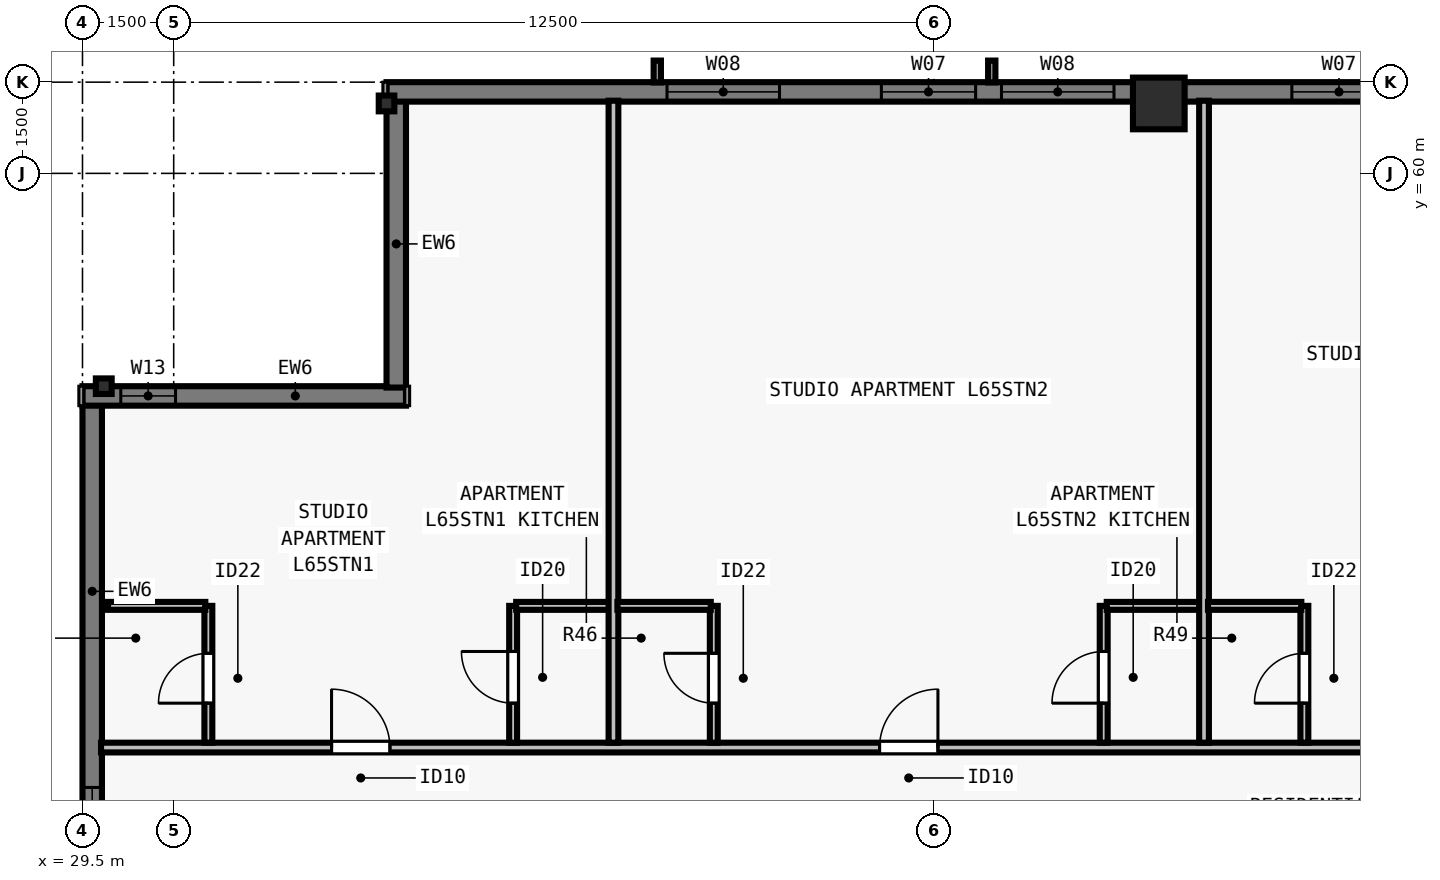
"""IFC4 building model, lengths in metres.
Left out: names, types, materials, properties, quantities, classifications, styles, units other than length and angle.
Written with IfcOpenShell. Run it as: python <this file> out.ifc"""

import sys

from ifc_helpers import new_model, si_unit, direction, frame, frame_2d, origin, origin_2d, place, context, subcontext, project, spatial, rectangle, i_section, extrude, element, fill, save


model = new_model("IFC4")
c1 = context("Model", 3, precision=1e-05, world=origin(), true_north=direction((0.0, 1.0)))
c2 = subcontext(c1, "Body", "Model", "MODEL_VIEW")
j1 = project(units=[si_unit("LENGTHUNIT", "METRE"), si_unit("PLANEANGLEUNIT", "RADIAN")], contexts=[c1])
p1 = place(None, origin())
s1 = spatial("IfcSite", under=j1, at=p1, CompositionType="ELEMENT")
p2 = place(p1, origin())
s2 = spatial("IfcBuilding", under=s1, at=p2, CompositionType="ELEMENT")
p3 = place(p2, frame((0.0, 0.0, 237.5)))
s3 = spatial("IfcBuildingStorey", under=s2, at=p3, CompositionType="ELEMENT", Elevation=237.5)
p4 = place(p3, frame((47.2, 61.15, 0.0), z_axis=(0.0, 0.0, 1.0), x_axis=(1.0, 0.0, 0.0)))
e1 = element("IfcColumn", 1, at=p4, inside=s3, PredefinedType="COLUMN", context=c2, shape_type="SweptSolid", body=[
    extrude(rectangle(XDim=0.85, YDim=0.85, at=origin_2d()), origin(), (0.0, 0.0, 1.0), 3.5),
])
for number, where, z_axis, x_axis in (
    (2, (34.5, 61.15, 0.0), (0.0, 0.0, 1.0), (1.0, 0.0, 0.0)),
    (3, (29.85, 56.5, 0.0), (0.0, 0.0, 1.0), (0.0, 1.0, 0.0)),
):
    element("IfcColumn", number, at=place(p3, frame(where, z_axis=z_axis, x_axis=x_axis)), inside=s3, PredefinedType="COLUMN", context=c2, shape_type="SweptSolid", body=[
        extrude(i_section(OverallWidth=0.256, OverallDepth=0.26, WebThickness=0.01, FlangeThickness=0.017, FilletRadius=0.013, at=origin_2d()), origin(), (0.0, 0.0, 1.0), 3.5),
    ])
p5 = place(p3, frame((29.66, 41.6, 0.0), z_axis=(0.0, 0.0, 1.0), x_axis=(0.0, 1.0, 0.0)))
e4 = element("IfcWall", 4, at=p5, inside=s3, PredefinedType="SOLIDWALL", context=c2, shape_type="SweptSolid", body=[
    extrude(rectangle(XDim=14.602, YDim=0.32, at=frame_2d((7.301, 0.0))), origin(), (0.0, 0.0, 1.0), 3.29),
])
p6 = place(p5, frame((3.15, 0.0, 0.8)))
e5 = element("IfcOpeningElement", 5, at=p6, cuts=e4, PredefinedType="OPENING", context=c2, shape_type="SweptSolid", body=[
    extrude(rectangle(XDim=1.85, YDim=1.678, at=frame_2d((0.925, 0.839))), frame((0.0, 0.17, 0.0), z_axis=(0.0, -1.0, 0.0), x_axis=(1.0, 0.0, 0.0)), (0.0, 0.0, 1.0), 0.34),
])
p7 = place(p5, frame((6.751, 0.0, 0.8)))
e6 = element("IfcOpeningElement", 6, at=p7, cuts=e4, PredefinedType="OPENING", context=c2, shape_type="SweptSolid", body=[
    extrude(rectangle(XDim=1.55, YDim=1.678, at=frame_2d((0.775, 0.839))), frame((0.0, 0.17, 0.0), z_axis=(0.0, -1.0, 0.0), x_axis=(1.0, 0.0, 0.0)), (0.0, 0.0, 1.0), 0.34),
])
p8 = place(p3, frame((29.5, 56.34, 0.0), z_axis=(0.0, 0.0, 1.0), x_axis=(1.0, 0.0, 0.0)))
e7 = element("IfcWall", 7, at=p8, inside=s3, PredefinedType="SOLIDWALL", context=c2, shape_type="SweptSolid", body=[
    extrude(rectangle(XDim=5.32, YDim=0.32, at=frame_2d((2.66, 0.0))), origin(), (0.0, 0.0, 1.0), 3.29),
])
p9 = place(p8, frame((0.63, 0.0, 0.8)))
e8 = element("IfcOpeningElement", 8, at=p9, cuts=e7, PredefinedType="OPENING", context=c2, shape_type="SweptSolid", body=[
    extrude(rectangle(XDim=0.9, YDim=1.678, at=frame_2d((0.45, 0.839))), frame((0.0, 0.17, 0.0), z_axis=(0.0, -1.0, 0.0), x_axis=(1.0, 0.0, 0.0)), (0.0, 0.0, 1.0), 0.34),
])
p10 = place(p3, frame((34.66, 56.478, 0.0), z_axis=(0.0, 0.0, 1.0), x_axis=(0.0, 1.0, 0.0)))
e9 = element("IfcWall", 9, at=p10, inside=s3, PredefinedType="SOLIDWALL", context=c2, shape_type="SweptSolid", body=[
    extrude(rectangle(XDim=4.724, YDim=0.32, at=frame_2d((2.362, 0.0))), origin(), (0.0, 0.0, 1.0), 3.29),
])
p11 = place(p3, frame((34.5, 61.34, 0.0), z_axis=(0.0, 0.0, 1.0), x_axis=(1.0, 0.0, 0.0)))
e10 = element("IfcWall", 10, at=p11, inside=s3, PredefinedType="SOLIDWALL", context=c2, shape_type="SweptSolid", body=[
    extrude(rectangle(XDim=34.702, YDim=0.32, at=frame_2d((17.351, 0.0))), origin(), (0.0, 0.0, 1.0), 3.29),
])
p12 = place(p11, frame((4.613, 0.0, 0.8)))
e11 = element("IfcOpeningElement", 11, at=p12, cuts=e10, PredefinedType="OPENING", context=c2, shape_type="SweptSolid", body=[
    extrude(rectangle(XDim=1.85, YDim=1.678, at=frame_2d((0.925, 0.839))), frame((0.0, 0.17, 0.0), z_axis=(0.0, -1.0, 0.0), x_axis=(1.0, 0.0, 0.0)), (0.0, 0.0, 1.0), 0.34),
])
p13 = place(p11, frame((8.138, 0.0, 0.8)))
e12 = element("IfcOpeningElement", 12, at=p13, cuts=e10, PredefinedType="OPENING", context=c2, shape_type="SweptSolid", body=[
    extrude(rectangle(XDim=1.55, YDim=1.678, at=frame_2d((0.775, 0.839))), frame((0.0, 0.17, 0.0), z_axis=(0.0, -1.0, 0.0), x_axis=(1.0, 0.0, 0.0)), (0.0, 0.0, 1.0), 0.34),
])
p14 = place(p11, frame((10.113, 0.0, 0.8)))
e13 = element("IfcOpeningElement", 13, at=p14, cuts=e10, PredefinedType="OPENING", context=c2, shape_type="SweptSolid", body=[
    extrude(rectangle(XDim=1.85, YDim=1.678, at=frame_2d((0.925, 0.839))), frame((0.0, 0.17, 0.0), z_axis=(0.0, -1.0, 0.0), x_axis=(1.0, 0.0, 0.0)), (0.0, 0.0, 1.0), 0.34),
])
p15 = place(p11, frame((14.888, 0.0, 0.8)))
e14 = element("IfcOpeningElement", 14, at=p15, cuts=e10, PredefinedType="OPENING", context=c2, shape_type="SweptSolid", body=[
    extrude(rectangle(XDim=1.55, YDim=1.678, at=frame_2d((0.775, 0.839))), frame((0.0, 0.17, 0.0), z_axis=(0.0, -1.0, 0.0), x_axis=(1.0, 0.0, 0.0)), (0.0, 0.0, 1.0), 0.34),
])
p16 = place(p11, frame((18.114, 0.0, 0.8)))
e15 = element("IfcOpeningElement", 15, at=p16, cuts=e10, PredefinedType="OPENING", context=c2, shape_type="SweptSolid", body=[
    extrude(rectangle(XDim=1.85, YDim=1.678, at=frame_2d((0.925, 0.839))), frame((0.0, 0.17, 0.0), z_axis=(0.0, -1.0, 0.0), x_axis=(1.0, 0.0, 0.0)), (0.0, 0.0, 1.0), 0.34),
])
p17 = place(p11, frame((24.864, 0.0, 0.8)))
e16 = element("IfcOpeningElement", 16, at=p17, cuts=e10, PredefinedType="OPENING", context=c2, shape_type="SweptSolid", body=[
    extrude(rectangle(XDim=1.85, YDim=1.678, at=frame_2d((0.925, 0.839))), frame((0.0, 0.17, 0.0), z_axis=(0.0, -1.0, 0.0), x_axis=(1.0, 0.0, 0.0)), (0.0, 0.0, 1.0), 0.34),
])
p18 = place(p11, frame((28.389, 0.0, 0.8)))
e17 = element("IfcOpeningElement", 17, at=p18, cuts=e10, PredefinedType="OPENING", context=c2, shape_type="SweptSolid", body=[
    extrude(rectangle(XDim=1.55, YDim=1.678, at=frame_2d((0.775, 0.839))), frame((0.0, 0.17, 0.0), z_axis=(0.0, -1.0, 0.0), x_axis=(1.0, 0.0, 0.0)), (0.0, 0.0, 1.0), 0.34),
])
p19 = place(p3, frame((29.805, 50.558, 0.0), z_axis=(0.0, 0.0, 1.0), x_axis=(1.0, 0.0, 0.0)))
e18 = element("IfcWall", 18, at=p19, inside=s3, PredefinedType="PARTITIONING", context=c2, shape_type="SweptSolid", body=[
    extrude(rectangle(XDim=44.39, YDim=0.16, at=frame_2d((22.195, 0.0))), origin(), (0.0, 0.0, 1.0), 2.958),
])
p20 = place(p19, frame((3.791, 0.0, 0.0)))
e19 = element("IfcOpeningElement", 19, at=p20, cuts=e18, PredefinedType="OPENING", context=c2, shape_type="SweptSolid", body=[
    extrude(rectangle(XDim=0.96, YDim=2.18, at=frame_2d((0.48, 1.09))), frame((0.0, 0.09, 0.0), z_axis=(0.0, -1.0, 0.0), x_axis=(1.0, 0.0, 0.0)), (0.0, 0.0, 1.0), 0.18),
])
p21 = place(p19, frame((12.803, 0.0, 0.0)))
e20 = element("IfcOpeningElement", 20, at=p21, cuts=e18, PredefinedType="OPENING", context=c2, shape_type="SweptSolid", body=[
    extrude(rectangle(XDim=0.96, YDim=2.18, at=frame_2d((0.48, 1.09))), frame((0.0, 0.09, 0.0), z_axis=(0.0, -1.0, 0.0), x_axis=(1.0, 0.0, 0.0)), (0.0, 0.0, 1.0), 0.18),
])
p22 = place(p19, frame((21.635, 0.0, 0.0)))
e21 = element("IfcOpeningElement", 21, at=p22, cuts=e18, PredefinedType="OPENING", context=c2, shape_type="SweptSolid", body=[
    extrude(rectangle(XDim=0.96, YDim=2.18, at=frame_2d((0.48, 1.09))), frame((0.0, 0.09, 0.0), z_axis=(0.0, -1.0, 0.0), x_axis=(1.0, 0.0, 0.0)), (0.0, 0.0, 1.0), 0.18),
])
p23 = place(p19, frame((30.467, 0.0, 0.0)))
e22 = element("IfcOpeningElement", 22, at=p23, cuts=e18, PredefinedType="OPENING", context=c2, shape_type="SweptSolid", body=[
    extrude(rectangle(XDim=0.96, YDim=2.18, at=frame_2d((0.48, 1.09))), frame((0.0, 0.09, 0.0), z_axis=(0.0, -1.0, 0.0), x_axis=(1.0, 0.0, 0.0)), (0.0, 0.0, 1.0), 0.18),
])
p24 = place(p19, frame((39.559, 0.0, 0.0)))
e23 = element("IfcOpeningElement", 23, at=p24, cuts=e18, PredefinedType="OPENING", context=c2, shape_type="SweptSolid", body=[
    extrude(rectangle(XDim=0.96, YDim=2.18, at=frame_2d((0.48, 1.09))), frame((0.0, 0.09, 0.0), z_axis=(0.0, -1.0, 0.0), x_axis=(1.0, 0.0, 0.0)), (0.0, 0.0, 1.0), 0.18),
])
p25 = place(p3, frame((31.57, 50.637, 0.0), z_axis=(0.0, 0.0, 1.0), x_axis=(0.0, 1.0, 0.0)))
e24 = element("IfcWall", 24, at=p25, inside=s3, PredefinedType="PLUMBINGWALL", context=c2, shape_type="SweptSolid", body=[
    extrude(rectangle(XDim=2.25, YDim=0.13, at=frame_2d((1.125, 0.0))), origin(), (0.0, 0.0, 1.0), 3.29),
])
p26 = place(p25, frame((0.65, 0.0, 0.0)))
e25 = element("IfcOpeningElement", 25, at=p26, cuts=e24, PredefinedType="OPENING", context=c2, shape_type="SweptSolid", body=[
    extrude(rectangle(XDim=0.82, YDim=2.1, at=frame_2d((0.41, 1.05))), frame((0.0, 0.075, 0.0), z_axis=(0.0, -1.0, 0.0), x_axis=(1.0, 0.0, 0.0)), (0.0, 0.0, 1.0), 0.15),
])
p27 = place(p3, frame((29.92, 52.887, 0.0), z_axis=(0.0, 0.0, 1.0), x_axis=(1.0, 0.0, 0.0)))
e26 = element("IfcWall", 26, at=p27, inside=s3, PredefinedType="PLUMBINGWALL", context=c2, shape_type="SweptSolid", body=[
    extrude(rectangle(XDim=1.6, YDim=0.13, at=frame_2d((0.8, 0.0))), origin(), (0.0, 0.0, 1.0), 3.29),
])
p28 = place(p3, frame((36.582, 50.637, 0.0), z_axis=(0.0, 0.0, 1.0), x_axis=(0.0, 1.0, 0.0)))
e27 = element("IfcWall", 27, at=p28, inside=s3, PredefinedType="PLUMBINGWALL", context=c2, shape_type="SweptSolid", body=[
    extrude(rectangle(XDim=2.25, YDim=0.13, at=frame_2d((1.125, 0.0))), origin(), (0.0, 0.0, 1.0), 3.29),
])
p29 = place(p28, frame((0.65, 0.0, 0.0)))
e28 = element("IfcOpeningElement", 28, at=p29, cuts=e27, PredefinedType="OPENING", context=c2, shape_type="SweptSolid", body=[
    extrude(rectangle(XDim=0.85, YDim=2.1, at=frame_2d((0.425, 1.05))), frame((0.0, 0.075, 0.0), z_axis=(0.0, -1.0, 0.0), x_axis=(1.0, 0.0, 0.0)), (0.0, 0.0, 1.0), 0.15),
])
p30 = place(p3, frame((36.632, 52.887, 0.0), z_axis=(0.0, 0.0, 1.0), x_axis=(1.0, 0.0, 0.0)))
e29 = element("IfcWall", 29, at=p30, inside=s3, PredefinedType="PLUMBINGWALL", context=c2, shape_type="SweptSolid", body=[
    extrude(rectangle(XDim=1.6, YDim=0.13, at=frame_2d((0.8, 0.0))), origin(), (0.0, 0.0, 1.0), 3.29),
])
p31 = place(p3, frame((38.232, 50.637, 0.0), z_axis=(0.0, 0.0, 1.0), x_axis=(0.0, 1.0, 0.0)))
e30 = element("IfcWall", 30, at=p31, inside=s3, PredefinedType="PARTITIONING", context=c2, shape_type="SweptSolid", body=[
    extrude(rectangle(XDim=10.558, YDim=0.16, at=frame_2d((5.279, 0.0))), origin(), (0.0, 0.0, 1.0), 2.573),
])
p32 = place(p3, frame((39.882, 50.637, 0.0), z_axis=(0.0, 0.0, 1.0), x_axis=(0.0, 1.0, 0.0)))
e31 = element("IfcWall", 31, at=p32, inside=s3, PredefinedType="PLUMBINGWALL", context=c2, shape_type="SweptSolid", body=[
    extrude(rectangle(XDim=2.25, YDim=0.13, at=frame_2d((1.125, 0.0))), origin(), (0.0, 0.0, 1.0), 3.29),
])
p33 = place(p32, frame((0.65, 0.0, 0.0)))
e32 = element("IfcOpeningElement", 32, at=p33, cuts=e31, PredefinedType="OPENING", context=c2, shape_type="SweptSolid", body=[
    extrude(rectangle(XDim=0.82, YDim=2.1, at=frame_2d((0.41, 1.05))), frame((0.0, 0.075, 0.0), z_axis=(0.0, -1.0, 0.0), x_axis=(1.0, 0.0, 0.0)), (0.0, 0.0, 1.0), 0.15),
])
p34 = place(p3, frame((38.297, 52.887, 0.0), z_axis=(0.0, 0.0, 1.0), x_axis=(1.0, 0.0, 0.0)))
e33 = element("IfcWall", 33, at=p34, inside=s3, PredefinedType="PLUMBINGWALL", context=c2, shape_type="SweptSolid", body=[
    extrude(rectangle(XDim=1.535, YDim=0.13, at=frame_2d((0.768, 0.0))), origin(), (0.0, 0.0, 1.0), 3.29),
])
p35 = place(p3, frame((46.294, 50.637, 0.0), z_axis=(0.0, 0.0, 1.0), x_axis=(0.0, 1.0, 0.0)))
e34 = element("IfcWall", 34, at=p35, inside=s3, PredefinedType="PLUMBINGWALL", context=c2, shape_type="SweptSolid", body=[
    extrude(rectangle(XDim=2.25, YDim=0.13, at=frame_2d((1.125, 0.0))), origin(), (0.0, 0.0, 1.0), 3.29),
])
p36 = place(p35, frame((0.65, 0.0, 0.0)))
e35 = element("IfcOpeningElement", 35, at=p36, cuts=e34, PredefinedType="OPENING", context=c2, shape_type="SweptSolid", body=[
    extrude(rectangle(XDim=0.85, YDim=2.1, at=frame_2d((0.425, 1.05))), frame((0.0, 0.075, 0.0), z_axis=(0.0, -1.0, 0.0), x_axis=(1.0, 0.0, 0.0)), (0.0, 0.0, 1.0), 0.15),
])
p37 = place(p3, frame((46.344, 52.887, 0.0), z_axis=(0.0, 0.0, 1.0), x_axis=(1.0, 0.0, 0.0)))
e36 = element("IfcWall", 36, at=p37, inside=s3, PredefinedType="PLUMBINGWALL", context=c2, shape_type="SweptSolid", body=[
    extrude(rectangle(XDim=1.6, YDim=0.13, at=frame_2d((0.8, 0.0))), origin(), (0.0, 0.0, 1.0), 3.29),
])
p38 = place(p3, frame((47.944, 50.637, 0.0), z_axis=(0.0, 0.0, 1.0), x_axis=(0.0, 1.0, 0.0)))
e37 = element("IfcWall", 37, at=p38, inside=s3, PredefinedType="PARTITIONING", context=c2, shape_type="SweptSolid", body=[
    extrude(rectangle(XDim=10.558, YDim=0.16, at=frame_2d((5.279, 0.0))), origin(), (0.0, 0.0, 1.0), 3.29),
])
p39 = place(p3, frame((49.594, 50.637, 0.0), z_axis=(0.0, 0.0, 1.0), x_axis=(0.0, 1.0, 0.0)))
e38 = element("IfcWall", 38, at=p39, inside=s3, PredefinedType="PLUMBINGWALL", context=c2, shape_type="SweptSolid", body=[
    extrude(rectangle(XDim=2.25, YDim=0.13, at=frame_2d((1.125, 0.0))), origin(), (0.0, 0.0, 1.0), 2.958),
])
p40 = place(p39, frame((0.65, 0.0, 0.0)))
e39 = element("IfcOpeningElement", 39, at=p40, cuts=e38, PredefinedType="OPENING", context=c2, shape_type="SweptSolid", body=[
    extrude(rectangle(XDim=0.82, YDim=2.1, at=frame_2d((0.41, 1.05))), frame((0.0, 0.075, 0.0), z_axis=(0.0, -1.0, 0.0), x_axis=(1.0, 0.0, 0.0)), (0.0, 0.0, 1.0), 0.15),
])
p41 = place(p3, frame((48.009, 52.887, 0.0), z_axis=(0.0, 0.0, 1.0), x_axis=(1.0, 0.0, 0.0)))
e40 = element("IfcWall", 40, at=p41, inside=s3, PredefinedType="PLUMBINGWALL", context=c2, shape_type="SweptSolid", body=[
    extrude(rectangle(XDim=1.535, YDim=0.13, at=frame_2d((0.768, 0.0))), origin(), (0.0, 0.0, 1.0), 3.29),
])
p42 = place(p7, origin())
e41 = element("IfcWindow", 41, at=p42, inside=s3, PartitioningType="SINGLE_PANEL", PredefinedType="WINDOW", context=c2, shape_type="SweptSolid", body=[
    extrude(rectangle(XDim=1.55, YDim=1.678, at=frame_2d((0.775, 0.839))), frame((0.0, -0.05, 0.0), z_axis=(0.0, -1.0, 0.0), x_axis=(1.0, 0.0, 0.0)), (0.0, 0.0, 1.0), 0.06),
])
fill(e6, e41)
p43 = place(p12, origin())
e42 = element("IfcWindow", 42, at=p43, inside=s3, PartitioningType="SINGLE_PANEL", PredefinedType="WINDOW", context=c2, shape_type="SweptSolid", body=[
    extrude(rectangle(XDim=1.85, YDim=1.678, at=frame_2d((0.925, 0.839))), frame((0.0, -0.05, 0.0), z_axis=(0.0, -1.0, 0.0), x_axis=(1.0, 0.0, 0.0)), (0.0, 0.0, 1.0), 0.06),
])
fill(e11, e42)
p44 = place(p13, origin())
e43 = element("IfcWindow", 43, at=p44, inside=s3, PartitioningType="SINGLE_PANEL", PredefinedType="WINDOW", context=c2, shape_type="SweptSolid", body=[
    extrude(rectangle(XDim=1.55, YDim=1.678, at=frame_2d((0.775, 0.839))), frame((0.0, -0.05, 0.0), z_axis=(0.0, -1.0, 0.0), x_axis=(1.0, 0.0, 0.0)), (0.0, 0.0, 1.0), 0.06),
])
fill(e12, e43)
p45 = place(p14, origin())
e44 = element("IfcWindow", 44, at=p45, inside=s3, PartitioningType="SINGLE_PANEL", PredefinedType="WINDOW", context=c2, shape_type="SweptSolid", body=[
    extrude(rectangle(XDim=1.85, YDim=1.678, at=frame_2d((0.925, 0.839))), frame((0.0, -0.05, 0.0), z_axis=(0.0, -1.0, 0.0), x_axis=(1.0, 0.0, 0.0)), (0.0, 0.0, 1.0), 0.06),
])
fill(e13, e44)
p46 = place(p15, origin())
e45 = element("IfcWindow", 45, at=p46, inside=s3, PartitioningType="SINGLE_PANEL", PredefinedType="WINDOW", context=c2, shape_type="SweptSolid", body=[
    extrude(rectangle(XDim=1.55, YDim=1.678, at=frame_2d((0.775, 0.839))), frame((0.0, -0.05, 0.0), z_axis=(0.0, -1.0, 0.0), x_axis=(1.0, 0.0, 0.0)), (0.0, 0.0, 1.0), 0.06),
])
fill(e14, e45)
p47 = place(p9, origin())
e46 = element("IfcWindow", 46, at=p47, inside=s3, PartitioningType="SINGLE_PANEL", PredefinedType="WINDOW", context=c2, shape_type="SweptSolid", body=[
    extrude(rectangle(XDim=0.9, YDim=1.678, at=frame_2d((0.45, 0.839))), frame((0.0, -0.04, 0.0), z_axis=(0.0, -1.0, 0.0), x_axis=(1.0, 0.0, 0.0)), (0.0, 0.0, 1.0), 0.06),
])
fill(e8, e46)
p48 = place(p26, origin())
e47 = element("IfcDoor", 47, at=p48, inside=s3, OperationType="SINGLE_SWING_LEFT", PredefinedType="DOOR", context=c2, shape_type="SweptSolid", body=[
    extrude(rectangle(XDim=0.82, YDim=2.1, at=frame_2d((0.41, 1.05))), frame((0.0, 0.025, 0.0), z_axis=(0.0, -1.0, 0.0), x_axis=(1.0, 0.0, 0.0)), (0.0, 0.0, 1.0), 0.05),
])
fill(e25, e47)
p49 = place(p29, origin())
e48 = element("IfcDoor", 48, at=p49, inside=s3, OperationType="SINGLE_SWING_RIGHT", PredefinedType="DOOR", context=c2, shape_type="SweptSolid", body=[
    extrude(rectangle(XDim=0.85, YDim=2.1, at=frame_2d((0.425, 1.05))), frame((0.0, 0.025, 0.0), z_axis=(0.0, -1.0, 0.0), x_axis=(1.0, 0.0, 0.0)), (0.0, 0.0, 1.0), 0.05),
])
fill(e28, e48)
p50 = place(p20, origin())
e49 = element("IfcDoor", 49, at=p50, inside=s3, OperationType="SINGLE_SWING_LEFT", PredefinedType="DOOR", context=c2, shape_type="SweptSolid", body=[
    extrude(rectangle(XDim=0.96, YDim=2.18, at=frame_2d((0.48, 1.09))), frame((0.0, 0.025, 0.0), z_axis=(0.0, -1.0, 0.0), x_axis=(1.0, 0.0, 0.0)), (0.0, 0.0, 1.0), 0.05),
])
fill(e19, e49)
p51 = place(p33, origin())
e50 = element("IfcDoor", 50, at=p51, inside=s3, OperationType="SINGLE_SWING_RIGHT", PredefinedType="DOOR", context=c2, shape_type="SweptSolid", body=[
    extrude(rectangle(XDim=0.82, YDim=2.1, at=frame_2d((0.41, 1.05))), frame((0.0, 0.025, 0.0), z_axis=(0.0, -1.0, 0.0), x_axis=(1.0, 0.0, 0.0)), (0.0, 0.0, 1.0), 0.05),
])
fill(e32, e50)
p52 = place(p36, origin())
e51 = element("IfcDoor", 51, at=p52, inside=s3, OperationType="SINGLE_SWING_LEFT", PredefinedType="DOOR", context=c2, shape_type="SweptSolid", body=[
    extrude(rectangle(XDim=0.85, YDim=2.1, at=frame_2d((0.425, 1.05))), frame((0.0, 0.025, 0.0), z_axis=(0.0, -1.0, 0.0), x_axis=(1.0, 0.0, 0.0)), (0.0, 0.0, 1.0), 0.05),
])
fill(e35, e51)
p53 = place(p21, origin())
e52 = element("IfcDoor", 52, at=p53, inside=s3, OperationType="SINGLE_SWING_RIGHT", PredefinedType="DOOR", context=c2, shape_type="SweptSolid", body=[
    extrude(rectangle(XDim=0.96, YDim=2.18, at=frame_2d((0.48, 1.09))), frame((0.0, 0.025, 0.0), z_axis=(0.0, -1.0, 0.0), x_axis=(1.0, 0.0, 0.0)), (0.0, 0.0, 1.0), 0.05),
])
fill(e20, e52)
p54 = place(p40, origin())
e53 = element("IfcDoor", 53, at=p54, inside=s3, OperationType="SINGLE_SWING_LEFT", PredefinedType="DOOR", context=c2, shape_type="SweptSolid", body=[
    extrude(rectangle(XDim=0.82, YDim=2.1, at=frame_2d((0.41, 1.05))), frame((0.0, 0.025, 0.0), z_axis=(0.0, -1.0, 0.0), x_axis=(1.0, 0.0, 0.0)), (0.0, 0.0, 1.0), 0.05),
])
fill(e39, e53)
save(model, sys.argv[1])
